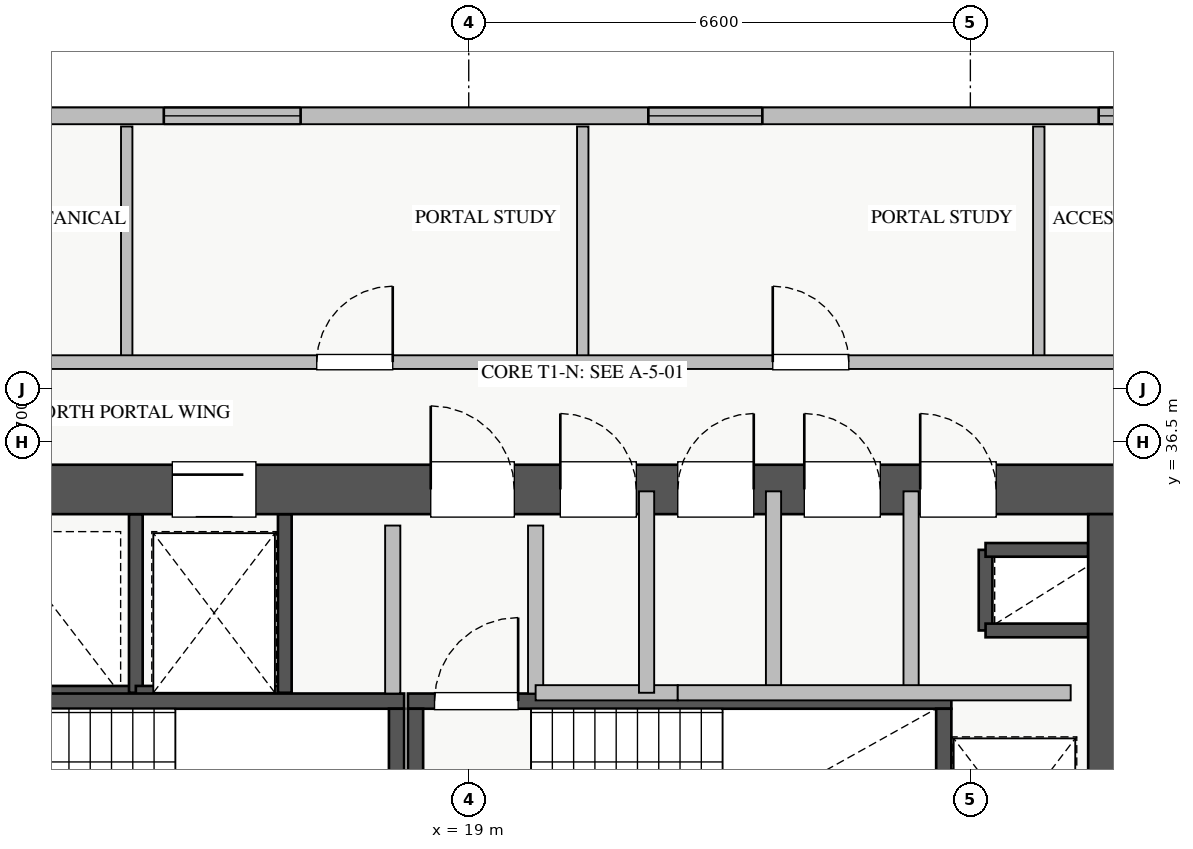
"""IFC4 building model, lengths in metres.
Left out: names, types, materials, properties, quantities, classifications, styles, units other than length and angle.
Written with IfcOpenShell. Run it as: python <this file> out.ifc"""

import sys

from ifc_helpers import new_model, si_unit, direction, frame, frame_2d, origin, place, context, subcontext, project, spatial, rectangle, extrude, source, transform, mapped, element, fill, save


model = new_model("IFC4")
c1 = context("Model", 3, precision=1e-05, world=origin(), true_north=direction((0.0, 1.0)))
c2 = subcontext(c1, "Body", "Model", "MODEL_VIEW")
j1 = project(units=[si_unit("LENGTHUNIT", "METRE"), si_unit("PLANEANGLEUNIT", "RADIAN")], contexts=[c1])
p1 = place(None, origin())
s1 = spatial("IfcSite", under=j1, at=p1, CompositionType="ELEMENT")
p2 = place(p1, origin())
s2 = spatial("IfcBuilding", under=s1, at=p2, CompositionType="ELEMENT")
p3 = place(p2, frame((0.0, 0.0, 163.25)))
s3 = spatial("IfcBuildingStorey", under=s2, at=p3, CompositionType="ELEMENT", Elevation=163.25)
p4 = place(p3, frame((12.68, 33.2, 0.0), z_axis=(0.0, 0.0, 1.0), x_axis=(1.0, 0.0, 0.0)))
e1 = element("IfcWall", 1, at=p4, inside=s3, PredefinedType="SHEAR", context=c2, shape_type="SweptSolid", body=[
    extrude(rectangle(XDim=1.94, YDim=0.18, at=frame_2d((0.97, 0.0))), origin(), (0.0, 0.0, 1.0), 3.07),
])
p5 = place(p3, frame((14.62, 33.2, 0.0), z_axis=(0.0, 0.0, 1.0), x_axis=(0.0, 1.0, 0.0)))
e2 = element("IfcWall", 2, at=p5, inside=s3, PredefinedType="SHEAR", context=c2, shape_type="SweptSolid", body=[
    extrude(rectangle(XDim=2.35, YDim=0.18, at=frame_2d((1.175, 0.0))), origin(), (0.0, 0.0, 1.0), 3.07),
])
p6 = place(p3, frame((25.8, 34.02, 0.0), z_axis=(0.0, 0.0, 1.0), x_axis=(0.0, 1.0, 0.0)))
e3 = element("IfcWall", 3, at=p6, inside=s3, PredefinedType="SHEAR", context=c2, shape_type="SweptSolid", body=[
    extrude(rectangle(XDim=1.06, YDim=0.18, at=frame_2d((0.53, 0.0))), origin(), (0.0, 0.0, 1.0), 3.07),
])
for number, where, z_axis, x_axis in (
    (4, (25.8, 35.08, 0.0), (0.0, 0.0, 1.0), (1.0, 0.0, 0.0)),
    (5, (25.8, 34.02, 0.0), (0.0, 0.0, 1.0), (1.0, 0.0, 0.0)),
):
    element("IfcWall", number, at=place(p3, frame(where, z_axis=z_axis, x_axis=x_axis)), inside=s3, PredefinedType="SHEAR", context=c2, shape_type="SweptSolid", body=[
        extrude(rectangle(XDim=1.35, YDim=0.18, at=frame_2d((0.675, 0.0))), origin(), (0.0, 0.0, 1.0), 3.07),
    ])
p7 = place(p3, frame((14.62, 33.2, 0.0), z_axis=(0.0, 0.0, 1.0), x_axis=(1.0, 0.0, 0.0)))
e6 = element("IfcWall", 6, at=p7, inside=s3, PredefinedType="SHEAR", context=c2, shape_type="SweptSolid", body=[
    extrude(rectangle(XDim=1.96, YDim=0.18, at=frame_2d((0.98, 0.0))), origin(), (0.0, 0.0, 1.0), 3.07),
])
p8 = place(p3, frame((16.58, 33.2, 0.0), z_axis=(0.0, 0.0, 1.0), x_axis=(0.0, 1.0, 0.0)))
e7 = element("IfcWall", 7, at=p8, inside=s3, PredefinedType="SHEAR", context=c2, shape_type="SweptSolid", body=[
    extrude(rectangle(XDim=2.35, YDim=0.18, at=frame_2d((1.175, 0.0))), origin(), (0.0, 0.0, 1.0), 3.07),
])
p9 = place(p3, frame((10.85, 33.09, 0.0), z_axis=(0.0, 0.0, 1.0), x_axis=(1.0, 0.0, 0.0)))
e8 = element("IfcWall", 8, at=p9, inside=s3, PredefinedType="SHEAR", context=c2, shape_type="SweptSolid", body=[
    extrude(rectangle(XDim=7.3, YDim=0.2, at=frame_2d((3.65, 0.0))), origin(), (0.0, 0.0, 1.0), 3.25),
])
p10 = place(p9, frame((0.35, 0.0, 0.0)))
e9 = element("IfcOpeningElement", 9, at=p10, cuts=e8, PredefinedType="OPENING", context=c2, shape_type="SweptSolid", body=[
    extrude(rectangle(XDim=1.1, YDim=2.05, at=frame_2d((0.55, 1.025))), frame((0.0, 0.11, 0.0), z_axis=(0.0, -1.0, 0.0), x_axis=(1.0, 0.0, 0.0)), (0.0, 0.0, 1.0), 0.22),
])
p11 = place(p3, frame((18.05, 30.05, 0.0), z_axis=(0.0, 0.0, 1.0), x_axis=(0.0, 1.0, 0.0)))
e10 = element("IfcWall", 10, at=p11, inside=s3, PredefinedType="SHEAR", context=c2, shape_type="SweptSolid", body=[
    extrude(rectangle(XDim=2.94, YDim=0.2, at=frame_2d((1.47, 0.0))), origin(), (0.0, 0.0, 1.0), 3.25),
])
p12 = place(p3, frame((18.2, 33.09, 0.0), z_axis=(0.0, 0.0, 1.0), x_axis=(1.0, 0.0, 0.0)))
e11 = element("IfcWall", 11, at=p12, inside=s3, PredefinedType="SHEAR", context=c2, shape_type="SweptSolid", body=[
    extrude(rectangle(XDim=7.15, YDim=0.2, at=frame_2d((3.575, 0.0))), origin(), (0.0, 0.0, 1.0), 3.25),
])
p13 = place(p12, frame((0.35, 0.0, 0.0)))
e12 = element("IfcOpeningElement", 12, at=p13, cuts=e11, PredefinedType="OPENING", context=c2, shape_type="SweptSolid", body=[
    extrude(rectangle(XDim=1.1, YDim=2.05, at=frame_2d((0.55, 1.025))), frame((0.0, 0.11, 0.0), z_axis=(0.0, -1.0, 0.0), x_axis=(1.0, 0.0, 0.0)), (0.0, 0.0, 1.0), 0.22),
])
for number, where, z_axis, x_axis in (
    (13, (18.3, 30.05, 0.0), (0.0, 0.0, 1.0), (0.0, 1.0, 0.0)),
    (14, (25.25, 30.05, 0.0), (0.0, 0.0, 1.0), (0.0, 1.0, 0.0)),
):
    element("IfcWall", number, at=place(p3, frame(where, z_axis=z_axis, x_axis=x_axis)), inside=s3, PredefinedType="SHEAR", context=c2, shape_type="SweptSolid", body=[
        extrude(rectangle(XDim=2.94, YDim=0.2, at=frame_2d((1.47, 0.0))), origin(), (0.0, 0.0, 1.0), 3.25),
    ])
p14 = place(p3, frame((10.2, 35.875, 0.0), z_axis=(0.0, 0.0, 1.0), x_axis=(1.0, 0.0, 0.0)))
e15 = element("IfcWall", 15, at=p14, inside=s3, PredefinedType="SHEAR", context=c2, shape_type="SweptSolid", body=[
    extrude(rectangle(XDim=17.6, YDim=0.65, at=frame_2d((8.8, 0.0))), origin(), (0.0, 0.0, 1.0), 3.25),
])
p15 = place(p14, frame((1.15, 0.0, 0.0)))
e16 = element("IfcOpeningElement", 16, at=p15, cuts=e15, PredefinedType="OPENING", context=c2, shape_type="SweptSolid", body=[
    extrude(rectangle(XDim=1.1, YDim=2.05, at=frame_2d((0.55, 1.025))), frame((0.0, 0.335, 0.0), z_axis=(0.0, -1.0, 0.0), x_axis=(1.0, 0.0, 0.0)), (0.0, 0.0, 1.0), 0.67),
])
p16 = place(p14, frame((8.3, 0.0, 0.0)))
e17 = element("IfcOpeningElement", 17, at=p16, cuts=e15, PredefinedType="OPENING", context=c2, shape_type="SweptSolid", body=[
    extrude(rectangle(XDim=1.1, YDim=2.05, at=frame_2d((0.55, 1.025))), frame((0.0, 0.335, 0.0), z_axis=(0.0, -1.0, 0.0), x_axis=(1.0, 0.0, 0.0)), (0.0, 0.0, 1.0), 0.67),
])
p17 = place(p14, frame((4.9, 0.0, 0.0)))
e18 = element("IfcOpeningElement", 18, at=p17, cuts=e15, PredefinedType="OPENING", context=c2, shape_type="SweptSolid", body=[
    extrude(rectangle(XDim=1.1, YDim=2.05, at=frame_2d((0.55, 1.025))), frame((0.0, 0.335, 0.0), z_axis=(0.0, -1.0, 0.0), x_axis=(1.0, 0.0, 0.0)), (0.0, 0.0, 1.0), 0.67),
])
p18 = place(p14, frame((14.74, 0.0, 0.0)))
e19 = element("IfcOpeningElement", 19, at=p18, cuts=e15, PredefinedType="OPENING", context=c2, shape_type="SweptSolid", body=[
    extrude(rectangle(XDim=1.0, YDim=2.05, at=frame_2d((0.5, 1.025))), frame((0.0, 0.335, 0.0), z_axis=(0.0, -1.0, 0.0), x_axis=(1.0, 0.0, 0.0)), (0.0, 0.0, 1.0), 0.67),
])
p19 = place(p14, frame((10.005, 0.0, 0.0)))
e20 = element("IfcOpeningElement", 20, at=p19, cuts=e15, PredefinedType="OPENING", context=c2, shape_type="SweptSolid", body=[
    extrude(rectangle(XDim=1.0, YDim=2.05, at=frame_2d((0.5, 1.025))), frame((0.0, 0.335, 0.0), z_axis=(0.0, -1.0, 0.0), x_axis=(1.0, 0.0, 0.0)), (0.0, 0.0, 1.0), 0.67),
])
p20 = place(p14, frame((11.55, 0.0, 0.0)))
e21 = element("IfcOpeningElement", 21, at=p20, cuts=e15, PredefinedType="OPENING", context=c2, shape_type="SweptSolid", body=[
    extrude(rectangle(XDim=1.0, YDim=2.05, at=frame_2d((0.5, 1.025))), frame((0.0, 0.335, 0.0), z_axis=(0.0, -1.0, 0.0), x_axis=(1.0, 0.0, 0.0)), (0.0, 0.0, 1.0), 0.67),
])
p21 = place(p14, frame((13.215, 0.0, 0.0)))
e22 = element("IfcOpeningElement", 22, at=p21, cuts=e15, PredefinedType="OPENING", context=c2, shape_type="SweptSolid", body=[
    extrude(rectangle(XDim=1.0, YDim=2.05, at=frame_2d((0.5, 1.025))), frame((0.0, 0.335, 0.0), z_axis=(0.0, -1.0, 0.0), x_axis=(1.0, 0.0, 0.0)), (0.0, 0.0, 1.0), 0.67),
])
p22 = place(p3, frame((27.475, 29.65, 0.0), z_axis=(0.0, 0.0, 1.0), x_axis=(0.0, 1.0, 0.0)))
e23 = element("IfcWall", 23, at=p22, inside=s3, PredefinedType="SHEAR", context=c2, shape_type="SweptSolid", body=[
    extrude(rectangle(XDim=5.9, YDim=0.65, at=frame_2d((2.95, 0.0))), origin(), (0.0, 0.0, 1.0), 3.25),
])
p23 = place(p22, frame((1.1, 0.0, 0.0)))
e24 = element("IfcOpeningElement", 24, at=p23, cuts=e23, PredefinedType="OPENING", context=c2, shape_type="SweptSolid", body=[
    extrude(rectangle(XDim=1.3, YDim=2.05, at=frame_2d((0.65, 1.025))), frame((0.0, 0.335, 0.0), z_axis=(0.0, -1.0, 0.0), x_axis=(1.0, 0.0, 0.0)), (0.0, 0.0, 1.0), 0.67),
])
p24 = place(p3, frame((6.55, 40.79, 0.0), z_axis=(0.0, 0.0, 1.0), x_axis=(1.0, 0.0, 0.0)))
e25 = element("IfcWall", 25, at=p24, inside=s3, PredefinedType="STANDARD", context=c2, shape_type="SweptSolid", body=[
    extrude(rectangle(XDim=24.9, YDim=0.22, at=frame_2d((12.45, 0.0))), origin(), (0.0, 0.0, 1.0), 2.61),
])
p25 = place(p24, frame((3.833, 0.0, 0.9)))
e26 = element("IfcOpeningElement", 26, at=p25, cuts=e25, PredefinedType="OPENING", context=c2, shape_type="SweptSolid", body=[
    extrude(rectangle(XDim=2.4, YDim=1.5, at=frame_2d((1.2, 0.75))), frame((0.0, 0.12, 0.0), z_axis=(0.0, -1.0, 0.0), x_axis=(1.0, 0.0, 0.0)), (0.0, 0.0, 1.0), 0.24),
])
p26 = place(p24, frame((8.438, 0.0, 0.9)))
e27 = element("IfcOpeningElement", 27, at=p26, cuts=e25, PredefinedType="OPENING", context=c2, shape_type="SweptSolid", body=[
    extrude(rectangle(XDim=1.8, YDim=1.45, at=frame_2d((0.9, 0.725))), frame((0.0, 0.12, 0.0), z_axis=(0.0, -1.0, 0.0), x_axis=(1.0, 0.0, 0.0)), (0.0, 0.0, 1.0), 0.24),
])
p27 = place(p24, frame((14.813, 0.0, 0.9)))
e28 = element("IfcOpeningElement", 28, at=p27, cuts=e25, PredefinedType="OPENING", context=c2, shape_type="SweptSolid", body=[
    extrude(rectangle(XDim=1.5, YDim=1.45, at=frame_2d((0.75, 0.725))), frame((0.0, 0.12, 0.0), z_axis=(0.0, -1.0, 0.0), x_axis=(1.0, 0.0, 0.0)), (0.0, 0.0, 1.0), 0.24),
])
p28 = place(p24, frame((20.738, 0.0, 0.9)))
e29 = element("IfcOpeningElement", 29, at=p28, cuts=e25, PredefinedType="OPENING", context=c2, shape_type="SweptSolid", body=[
    extrude(rectangle(XDim=2.1, YDim=1.48, at=frame_2d((1.05, 0.74))), frame((0.0, 0.12, 0.0), z_axis=(0.0, -1.0, 0.0), x_axis=(1.0, 0.0, 0.0)), (0.0, 0.0, 1.0), 0.24),
])
for number, where, z_axis, x_axis in (
    (30, (18.0, 33.19, 0.0), (0.0, 0.0, 1.0), (0.0, 1.0, 0.0)),
    (31, (19.88, 33.19, 0.0), (0.0, 0.0, 1.0), (0.0, 1.0, 0.0)),
):
    element("IfcWall", number, at=place(p3, frame(where, z_axis=z_axis, x_axis=x_axis)), inside=s3, PredefinedType="PARTITIONING", context=c2, shape_type="SweptSolid", body=[
        extrude(rectangle(XDim=2.21, YDim=0.2, at=frame_2d((1.105, 0.0))), origin(), (0.0, 0.0, 1.0), 3.07),
    ])
p29 = place(p3, frame((24.82, 33.2, 0.0), z_axis=(0.0, 0.0, 1.0), x_axis=(0.0, 1.0, 0.0)))
e32 = element("IfcWall", 32, at=p29, inside=s3, PredefinedType="PARTITIONING", context=c2, shape_type="SweptSolid", body=[
    extrude(rectangle(XDim=2.65, YDim=0.2, at=frame_2d((1.325, 0.0))), origin(), (0.0, 0.0, 1.0), 3.07),
])
p30 = place(p3, frame((19.88, 33.2, 0.0), z_axis=(0.0, 0.0, 1.0), x_axis=(1.0, 0.0, 0.0)))
e33 = element("IfcWall", 33, at=p30, inside=s3, PredefinedType="PARTITIONING", context=c2, shape_type="SweptSolid", body=[
    extrude(rectangle(XDim=1.87, YDim=0.2, at=frame_2d((0.935, 0.0))), origin(), (0.0, 0.0, 1.0), 3.07),
])
for number, where, z_axis, x_axis in (
    (34, (21.34, 33.2, 0.0), (0.0, 0.0, 1.0), (0.0, 1.0, 0.0)),
    (35, (23.01, 33.2, 0.0), (0.0, 0.0, 1.0), (0.0, 1.0, 0.0)),
):
    element("IfcWall", number, at=place(p3, frame(where, z_axis=z_axis, x_axis=x_axis)), inside=s3, PredefinedType="PARTITIONING", context=c2, shape_type="SweptSolid", body=[
        extrude(rectangle(XDim=2.65, YDim=0.2, at=frame_2d((1.325, 0.0))), origin(), (0.0, 0.0, 1.0), 3.07),
    ])
p31 = place(p3, frame((21.75, 33.2, 0.0), z_axis=(0.0, 0.0, 1.0), x_axis=(1.0, 0.0, 0.0)))
e36 = element("IfcWall", 36, at=p31, inside=s3, PredefinedType="PARTITIONING", context=c2, shape_type="SweptSolid", body=[
    extrude(rectangle(XDim=5.17, YDim=0.2, at=frame_2d((2.585, 0.0))), origin(), (0.0, 0.0, 1.0), 3.07),
])
for number, where, z_axis, x_axis in (
    (37, (14.5, 37.55, 0.0), (0.0, 0.0, 1.0), (0.0, 1.0, 0.0)),
    (38, (20.5, 37.55, 0.0), (0.0, 0.0, 1.0), (0.0, 1.0, 0.0)),
    (39, (26.5, 37.55, 0.0), (0.0, 0.0, 1.0), (0.0, 1.0, 0.0)),
):
    element("IfcWall", number, at=place(p3, frame(where, z_axis=z_axis, x_axis=x_axis)), inside=s3, PredefinedType="PARTITIONING", context=c2, shape_type="SweptSolid", body=[
        extrude(rectangle(XDim=3.1, YDim=0.15, at=frame_2d((1.55, 0.0))), origin(), (0.0, 0.0, 1.0), 3.07),
    ])
p32 = place(p3, frame((8.65, 37.55, 0.0), z_axis=(0.0, 0.0, 1.0), x_axis=(1.0, 0.0, 0.0)))
e40 = element("IfcWall", 40, at=p32, inside=s3, PredefinedType="PARTITIONING", context=c2, shape_type="SweptSolid", body=[
    extrude(rectangle(XDim=23.8, YDim=0.18, at=frame_2d((11.9, 0.0))), origin(), (0.0, 0.0, 1.0), 3.07),
])
p33 = place(p32, frame((2.425, 0.0, 0.0)))
e41 = element("IfcOpeningElement", 41, at=p33, cuts=e40, PredefinedType="OPENING", context=c2, shape_type="SweptSolid", body=[
    extrude(rectangle(XDim=1.0, YDim=2.05, at=frame_2d((0.5, 1.025))), frame((0.0, 0.1, 0.0), z_axis=(0.0, -1.0, 0.0), x_axis=(1.0, 0.0, 0.0)), (0.0, 0.0, 1.0), 0.2),
])
p34 = place(p32, frame((8.35, 0.0, 0.0)))
e42 = element("IfcOpeningElement", 42, at=p34, cuts=e40, PredefinedType="OPENING", context=c2, shape_type="SweptSolid", body=[
    extrude(rectangle(XDim=1.0, YDim=2.05, at=frame_2d((0.5, 1.025))), frame((0.0, 0.1, 0.0), z_axis=(0.0, -1.0, 0.0), x_axis=(1.0, 0.0, 0.0)), (0.0, 0.0, 1.0), 0.2),
])
p35 = place(p32, frame((14.35, 0.0, 0.0)))
e43 = element("IfcOpeningElement", 43, at=p35, cuts=e40, PredefinedType="OPENING", context=c2, shape_type="SweptSolid", body=[
    extrude(rectangle(XDim=1.0, YDim=2.05, at=frame_2d((0.5, 1.025))), frame((0.0, 0.1, 0.0), z_axis=(0.0, -1.0, 0.0), x_axis=(1.0, 0.0, 0.0)), (0.0, 0.0, 1.0), 0.2),
])
p36 = place(p32, frame((20.325, 0.0, 0.0)))
e44 = element("IfcOpeningElement", 44, at=p36, cuts=e40, PredefinedType="OPENING", context=c2, shape_type="SweptSolid", body=[
    extrude(rectangle(XDim=1.0, YDim=2.05, at=frame_2d((0.5, 1.025))), frame((0.0, 0.1, 0.0), z_axis=(0.0, -1.0, 0.0), x_axis=(1.0, 0.0, 0.0)), (0.0, 0.0, 1.0), 0.2),
])
m1 = source(origin(), c2, "Body", "SweptSolid", [
    extrude(rectangle(XDim=1.8, YDim=1.45, at=frame_2d((0.9, 0.725))), frame((0.0, 0.03, 0.0), z_axis=(0.0, -1.0, 0.0), x_axis=(1.0, 0.0, 0.0)), (0.0, 0.0, 1.0), 0.06),
])
p37 = place(p26, origin())
e45 = element("IfcWindow", 45, at=p37, inside=s3, PartitioningType="DOUBLE_PANEL_VERTICAL", PredefinedType="WINDOW", context=c2, shape_type="MappedRepresentation", body=[
    mapped(m1, transform((0.0, 0.0, 0.0), x_axis=(1.0, 0.0, 0.0), y_axis=(0.0, 1.0, 0.0), z_axis=(0.0, 0.0, 1.0), scale=1.0)),
])
fill(e27, e45)
m2 = source(origin(), c2, "Body", "SweptSolid", [
    extrude(rectangle(XDim=1.5, YDim=1.45, at=frame_2d((0.75, 0.725))), frame((0.0, 0.03, 0.0), z_axis=(0.0, -1.0, 0.0), x_axis=(1.0, 0.0, 0.0)), (0.0, 0.0, 1.0), 0.06),
])
p38 = place(p27, origin())
e46 = element("IfcWindow", 46, at=p38, inside=s3, PartitioningType="DOUBLE_PANEL_VERTICAL", PredefinedType="WINDOW", context=c2, shape_type="MappedRepresentation", body=[
    mapped(m2, transform((0.0, 0.0, 0.0), x_axis=(1.0, 0.0, 0.0), y_axis=(0.0, 1.0, 0.0), z_axis=(0.0, 0.0, 1.0), scale=1.0)),
])
fill(e28, e46)
m3 = source(origin(), c2, "Body", "SweptSolid", [
    extrude(rectangle(XDim=2.1, YDim=1.48, at=frame_2d((1.05, 0.74))), frame((0.0, 0.03, 0.0), z_axis=(0.0, -1.0, 0.0), x_axis=(1.0, 0.0, 0.0)), (0.0, 0.0, 1.0), 0.06),
])
p39 = place(p28, origin())
e47 = element("IfcWindow", 47, at=p39, inside=s3, PartitioningType="TRIPLE_PANEL_VERTICAL", PredefinedType="WINDOW", context=c2, shape_type="MappedRepresentation", body=[
    mapped(m3, transform((0.0, 0.0, 0.0), x_axis=(1.0, 0.0, 0.0), y_axis=(0.0, 1.0, 0.0), z_axis=(0.0, 0.0, 1.0), scale=1.0)),
])
fill(e29, e47)
m4 = source(origin(), c2, "Body", "SweptSolid", [
    extrude(rectangle(XDim=1.1, YDim=2.05, at=frame_2d((0.55, 1.025))), frame((0.0, 0.025, 0.0), z_axis=(0.0, -1.0, 0.0), x_axis=(1.0, 0.0, 0.0)), (0.0, 0.0, 1.0), 0.05),
])
p40 = place(p16, origin())
e48 = element("IfcDoor", 48, at=p40, inside=s3, OperationType="SINGLE_SWING_LEFT", PredefinedType="DOOR", context=c2, shape_type="MappedRepresentation", body=[
    mapped(m4, transform((0.0, 0.0, 0.0), x_axis=(1.0, 0.0, 0.0), y_axis=(0.0, 1.0, 0.0), z_axis=(0.0, 0.0, 1.0), scale=1.0)),
])
fill(e17, e48)
p41 = place(p13, origin())
e49 = element("IfcDoor", 49, at=p41, inside=s3, OperationType="SINGLE_SWING_RIGHT", PredefinedType="DOOR", context=c2, shape_type="MappedRepresentation", body=[
    mapped(m4, transform((0.0, 0.0, 0.0), x_axis=(1.0, 0.0, 0.0), y_axis=(0.0, 1.0, 0.0), z_axis=(0.0, 0.0, 1.0), scale=1.0)),
])
fill(e12, e49)
p42 = place(p17, origin())
e50 = element("IfcDoor", 50, at=p42, inside=s3, OperationType="SLIDING_TO_LEFT", PredefinedType="DOOR", context=c2, shape_type="MappedRepresentation", body=[
    mapped(m4, transform((0.0, 0.0, 0.0), x_axis=(1.0, 0.0, 0.0), y_axis=(0.0, 1.0, 0.0), z_axis=(0.0, 0.0, 1.0), scale=1.0)),
])
fill(e18, e50)
m5 = source(origin(), c2, "Body", "SweptSolid", [
    extrude(rectangle(XDim=1.0, YDim=2.05, at=frame_2d((0.5, 1.025))), frame((0.0, 0.025, 0.0), z_axis=(0.0, -1.0, 0.0), x_axis=(1.0, 0.0, 0.0)), (0.0, 0.0, 1.0), 0.05),
])
p43 = place(p18, origin())
e51 = element("IfcDoor", 51, at=p43, inside=s3, OperationType="SINGLE_SWING_LEFT", PredefinedType="DOOR", context=c2, shape_type="MappedRepresentation", body=[
    mapped(m5, transform((0.0, 0.0, 0.0), x_axis=(1.0, 0.0, 0.0), y_axis=(0.0, 1.0, 0.0), z_axis=(0.0, 0.0, 1.0), scale=1.0)),
])
fill(e19, e51)
p44 = place(p19, origin())
e52 = element("IfcDoor", 52, at=p44, inside=s3, OperationType="SINGLE_SWING_LEFT", PredefinedType="DOOR", context=c2, shape_type="MappedRepresentation", body=[
    mapped(m5, transform((0.0, 0.0, 0.0), x_axis=(1.0, 0.0, 0.0), y_axis=(0.0, 1.0, 0.0), z_axis=(0.0, 0.0, 1.0), scale=1.0)),
])
fill(e20, e52)
p45 = place(p20, origin())
e53 = element("IfcDoor", 53, at=p45, inside=s3, OperationType="SINGLE_SWING_RIGHT", PredefinedType="DOOR", context=c2, shape_type="MappedRepresentation", body=[
    mapped(m5, transform((0.0, 0.0, 0.0), x_axis=(1.0, 0.0, 0.0), y_axis=(0.0, 1.0, 0.0), z_axis=(0.0, 0.0, 1.0), scale=1.0)),
])
fill(e21, e53)
p46 = place(p21, origin())
e54 = element("IfcDoor", 54, at=p46, inside=s3, OperationType="SINGLE_SWING_LEFT", PredefinedType="DOOR", context=c2, shape_type="MappedRepresentation", body=[
    mapped(m5, transform((0.0, 0.0, 0.0), x_axis=(1.0, 0.0, 0.0), y_axis=(0.0, 1.0, 0.0), z_axis=(0.0, 0.0, 1.0), scale=1.0)),
])
fill(e22, e54)
p47 = place(p34, origin())
e55 = element("IfcDoor", 55, at=p47, inside=s3, OperationType="SINGLE_SWING_RIGHT", PredefinedType="DOOR", context=c2, shape_type="MappedRepresentation", body=[
    mapped(m5, transform((0.0, 0.0, 0.0), x_axis=(1.0, 0.0, 0.0), y_axis=(0.0, 1.0, 0.0), z_axis=(0.0, 0.0, 1.0), scale=1.0)),
])
fill(e42, e55)
p48 = place(p35, origin())
e56 = element("IfcDoor", 56, at=p48, inside=s3, OperationType="SINGLE_SWING_LEFT", PredefinedType="DOOR", context=c2, shape_type="MappedRepresentation", body=[
    mapped(m5, transform((0.0, 0.0, 0.0), x_axis=(1.0, 0.0, 0.0), y_axis=(0.0, 1.0, 0.0), z_axis=(0.0, 0.0, 1.0), scale=1.0)),
])
fill(e43, e56)
save(model, sys.argv[1])
